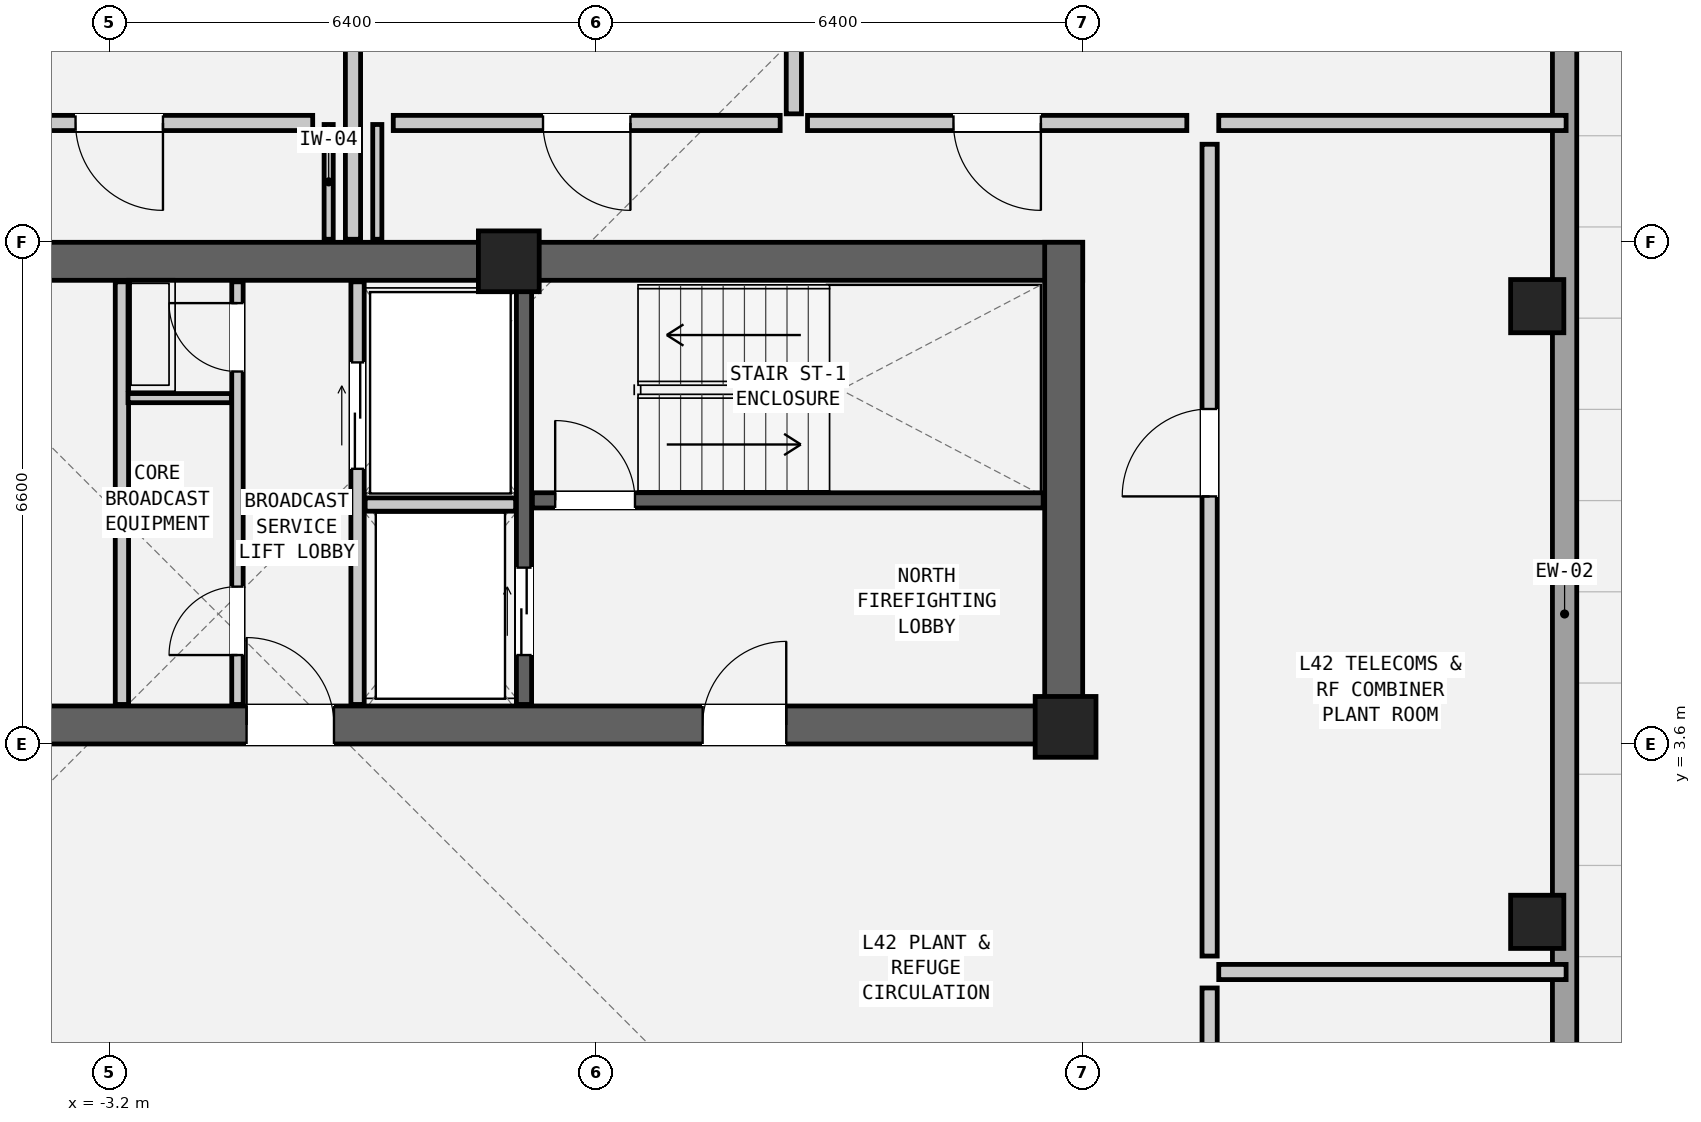
"""IFC4 building model, lengths in metres.
Left out: names, types, materials, properties, quantities, classifications, styles, units other than length and angle.
Written with IfcOpenShell. Run it as: python <this file> out.ifc"""

import sys

from ifc_helpers import new_model, si_unit, direction, frame, frame_2d, origin, origin_2d, place, context, subcontext, project, spatial, rectangle, hollow_rectangle, extrude, element, fill, save


model = new_model("IFC4")
c1 = context("Model", 3, precision=1e-05, world=origin(), true_north=direction((0.0, 1.0)))
c2 = subcontext(c1, "Body", "Model", "MODEL_VIEW")
j1 = project(units=[si_unit("LENGTHUNIT", "METRE"), si_unit("PLANEANGLEUNIT", "RADIAN")], contexts=[c1])
p1 = place(None, origin())
s1 = spatial("IfcSite", under=j1, at=p1, CompositionType="ELEMENT")
p2 = place(p1, origin())
s2 = spatial("IfcBuilding", under=s1, at=p2, CompositionType="ELEMENT")
p3 = place(p2, frame((0.0, 0.0, 144.6)))
s3 = spatial("IfcBuildingStorey", under=s2, at=p3, CompositionType="ELEMENT", Elevation=144.6)
p4 = place(p3, frame((-9.6, 9.95, 0.0), z_axis=(0.0, 0.0, 1.0), x_axis=(1.0, 0.0, 0.0)))
e1 = element("IfcWall", 1, at=p4, inside=s3, PredefinedType="SHEAR", context=c2, shape_type="SweptSolid", body=[
    extrude(rectangle(XDim=19.2, YDim=0.5, at=frame_2d((9.6, 0.0))), origin(), (0.0, 0.0, 1.0), 3.6),
])
p5 = place(p3, frame((-9.6, 3.85, 0.0), z_axis=(0.0, 0.0, 1.0), x_axis=(1.0, 0.0, 0.0)))
e2 = element("IfcWall", 2, at=p5, inside=s3, PredefinedType="SHEAR", context=c2, shape_type="SweptSolid", body=[
    extrude(rectangle(XDim=19.2, YDim=0.5, at=frame_2d((9.6, 0.0))), origin(), (0.0, 0.0, 1.0), 3.6),
])
p6 = place(p5, frame((14.2, 0.0, 0.0)))
e3 = element("IfcOpeningElement", 3, at=p6, cuts=e2, PredefinedType="OPENING", context=c2, shape_type="SweptSolid", body=[
    extrude(rectangle(XDim=1.1, YDim=2.08, at=frame_2d((0.55, 1.04))), frame((0.0, 0.262, 0.0), z_axis=(0.0, -1.0, 0.0), x_axis=(1.0, 0.0, 0.0)), (0.0, 0.0, 1.0), 0.524),
])
p7 = place(p5, frame((8.2, 0.0, 0.0)))
e4 = element("IfcOpeningElement", 4, at=p7, cuts=e2, PredefinedType="OPENING", context=c2, shape_type="SweptSolid", body=[
    extrude(rectangle(XDim=1.15, YDim=2.1, at=frame_2d((0.575, 1.05))), frame((0.0, 0.262, 0.0), z_axis=(0.0, -1.0, 0.0), x_axis=(1.0, 0.0, 0.0)), (0.0, 0.0, 1.0), 0.524),
])
p8 = place(p5, frame((2.5, 0.0, 0.0)))
e5 = element("IfcOpeningElement", 5, at=p8, cuts=e2, PredefinedType="OPENING", context=c2, shape_type="SweptSolid", body=[
    extrude(rectangle(XDim=1.2, YDim=2.1, at=frame_2d((0.6, 1.05))), frame((0.0, 0.262, 0.0), z_axis=(0.0, -1.0, 0.0), x_axis=(1.0, 0.0, 0.0)), (0.0, 0.0, 1.0), 0.524),
])
p9 = place(p3, frame((9.35, 3.6, 0.0), z_axis=(0.0, 0.0, 1.0), x_axis=(0.0, 1.0, 0.0)))
e6 = element("IfcWall", 6, at=p9, inside=s3, PredefinedType="SHEAR", context=c2, shape_type="SweptSolid", body=[
    extrude(rectangle(XDim=6.6, YDim=0.5, at=frame_2d((3.3, 0.0))), origin(), (0.0, 0.0, 1.0), 3.6),
])
for number, where, z_axis, x_axis in (
    (7, (15.58, 1.26, 0.0), (0.0, 0.0, 1.0), (0.0, 1.0, 0.0)),
    (8, (15.58, 9.36, 0.0), (0.0, 0.0, 1.0), (0.0, 1.0, 0.0)),
):
    element("IfcColumn", number, at=place(p3, frame(where, z_axis=z_axis, x_axis=x_axis)), inside=s3, PredefinedType="COLUMN", context=c2, shape_type="SweptSolid", body=[
        extrude(hollow_rectangle(XDim=0.7, YDim=0.7, WallThickness=0.045, at=origin_2d()), origin(), (0.0, 0.0, 1.0), 3.6),
    ])
for number, where, z_axis, x_axis in (
    (9, (2.05, 9.95, 0.0), (0.0, 0.0, 1.0), (1.0, 0.0, 0.0)),
    (10, (9.375, 3.825, 0.0), (0.0, 0.0, 1.0), (1.0, 0.0, 0.0)),
):
    element("IfcColumn", number, at=place(p3, frame(where, z_axis=z_axis, x_axis=x_axis)), inside=s3, PredefinedType="COLUMN", context=c2, shape_type="SweptSolid", body=[
        extrude(rectangle(XDim=0.8, YDim=0.8, at=origin_2d()), origin(), (0.0, 0.0, 1.0), 3.6),
    ])
p10 = place(p3, frame((15.94, 17.122, 0.0), z_axis=(0.0, 0.0, 1.0), x_axis=(0.0, -1.0, 0.0)))
e11 = element("IfcWall", 11, at=p10, inside=s3, PredefinedType="SOLIDWALL", context=c2, shape_type="SweptSolid", body=[
    extrude(rectangle(XDim=23.624, YDim=0.32, at=frame_2d((11.812, 0.0))), origin(), (0.0, 0.0, 1.0), 2.242),
])
p11 = place(p3, frame((2.36, 6.805, 0.0), z_axis=(0.0, 0.0, 1.0), x_axis=(1.0, 0.0, 0.0)))
e12 = element("IfcWall", 12, at=p11, inside=s3, PredefinedType="SHEAR", context=c2, shape_type="SweptSolid", body=[
    extrude(rectangle(XDim=6.72, YDim=0.2, at=frame_2d((3.36, 0.0))), origin(), (0.0, 0.0, 1.0), 3.38),
])
p12 = place(p11, frame((0.3, 0.0, 0.0)))
e13 = element("IfcOpeningElement", 13, at=p12, cuts=e12, PredefinedType="OPENING", context=c2, shape_type="SweptSolid", body=[
    extrude(rectangle(XDim=1.05, YDim=2.08, at=frame_2d((0.525, 1.04))), frame((0.0, 0.112, 0.0), z_axis=(0.0, -1.0, 0.0), x_axis=(1.0, 0.0, 0.0)), (0.0, 0.0, 1.0), 0.224),
])
p13 = place(p3, frame((2.25, 4.12, 0.0), z_axis=(0.0, 0.0, 1.0), x_axis=(0.0, 1.0, 0.0)))
e14 = element("IfcWall", 14, at=p13, inside=s3, PredefinedType="SHEAR", context=c2, shape_type="SweptSolid", body=[
    extrude(rectangle(XDim=5.56, YDim=0.2, at=frame_2d((2.78, 0.0))), origin(), (0.0, 0.0, 1.0), 3.38),
])
p14 = place(p13, frame((0.65, 0.0, 0.0)))
e15 = element("IfcOpeningElement", 15, at=p14, cuts=e14, PredefinedType="OPENING", context=c2, shape_type="SweptSolid", body=[
    extrude(rectangle(XDim=1.15, YDim=2.08, at=frame_2d((0.575, 1.04))), frame((0.0, 0.112, 0.0), z_axis=(0.0, -1.0, 0.0), x_axis=(1.0, 0.0, 0.0)), (0.0, 0.0, 1.0), 0.224),
])
p15 = place(p3, frame((0.06, 4.12, 0.0), z_axis=(0.0, 0.0, 1.0), x_axis=(0.0, 1.0, 0.0)))
e16 = element("IfcWall", 16, at=p15, inside=s3, PredefinedType="PARTITIONING", context=c2, shape_type="SweptSolid", body=[
    extrude(rectangle(XDim=5.56, YDim=0.175, at=frame_2d((2.78, 0.0))), origin(), (0.0, 0.0, 1.0), 3.38),
])
p16 = place(p15, frame((3.1, 0.0, 0.0)))
e17 = element("IfcOpeningElement", 17, at=p16, cuts=e16, PredefinedType="OPENING", context=c2, shape_type="SweptSolid", body=[
    extrude(rectangle(XDim=1.4, YDim=2.12, at=frame_2d((0.7, 1.06))), frame((0.0, 0.1, 0.0), z_axis=(0.0, -1.0, 0.0), x_axis=(1.0, 0.0, 0.0)), (0.0, 0.0, 1.0), 0.199),
])
p17 = place(p3, frame((0.16, 6.75, 0.0), z_axis=(0.0, 0.0, 1.0), x_axis=(1.0, 0.0, 0.0)))
e18 = element("IfcWall", 18, at=p17, inside=s3, PredefinedType="PARTITIONING", context=c2, shape_type="SweptSolid", body=[
    extrude(rectangle(XDim=1.98, YDim=0.175, at=frame_2d((0.99, 0.0))), origin(), (0.0, 0.0, 1.0), 3.38),
])
p18 = place(p3, frame((-3.04, 4.12, 0.0), z_axis=(0.0, 0.0, 1.0), x_axis=(0.0, 1.0, 0.0)))
e19 = element("IfcWall", 19, at=p18, inside=s3, PredefinedType="PARTITIONING", context=c2, shape_type="SweptSolid", body=[
    extrude(rectangle(XDim=5.56, YDim=0.175, at=frame_2d((2.78, 0.0))), origin(), (0.0, 0.0, 1.0), 3.38),
])
p19 = place(p3, frame((-1.52, 4.12, 0.0), z_axis=(0.0, 0.0, 1.0), x_axis=(0.0, 1.0, 0.0)))
e20 = element("IfcWall", 20, at=p19, inside=s3, PredefinedType="PARTITIONING", context=c2, shape_type="SweptSolid", body=[
    extrude(rectangle(XDim=5.56, YDim=0.15, at=frame_2d((2.78, 0.0))), origin(), (0.0, 0.0, 1.0), 3.38),
])
p20 = place(p19, frame((4.38, 0.0, 0.0)))
e21 = element("IfcOpeningElement", 21, at=p20, cuts=e20, PredefinedType="OPENING", context=c2, shape_type="SweptSolid", body=[
    extrude(rectangle(XDim=0.9, YDim=2.05, at=frame_2d((0.45, 1.025))), frame((0.0, 0.087, 0.0), z_axis=(0.0, -1.0, 0.0), x_axis=(1.0, 0.0, 0.0)), (0.0, 0.0, 1.0), 0.174),
])
p21 = place(p19, frame((0.65, 0.0, 0.0)))
e22 = element("IfcOpeningElement", 22, at=p21, cuts=e20, PredefinedType="OPENING", context=c2, shape_type="SweptSolid", body=[
    extrude(rectangle(XDim=0.9, YDim=2.05, at=frame_2d((0.45, 1.025))), frame((0.0, 0.087, 0.0), z_axis=(0.0, -1.0, 0.0), x_axis=(1.0, 0.0, 0.0)), (0.0, 0.0, 1.0), 0.174),
])
p22 = place(p3, frame((-2.96, 8.15, 0.0), z_axis=(0.0, 0.0, 1.0), x_axis=(1.0, 0.0, 0.0)))
e23 = element("IfcWall", 23, at=p22, inside=s3, PredefinedType="PARTITIONING", context=c2, shape_type="SweptSolid", body=[
    extrude(rectangle(XDim=1.36, YDim=0.12, at=frame_2d((0.68, 0.0))), origin(), (0.0, 0.0, 1.0), 3.38),
])
p23 = place(p3, frame((0.0, 10.24, 0.0), z_axis=(0.0, 0.0, 1.0), x_axis=(0.0, 1.0, 0.0)))
e24 = element("IfcWall", 24, at=p23, inside=s3, PredefinedType="PARTITIONING", context=c2, shape_type="SweptSolid", body=[
    extrude(rectangle(XDim=12.8, YDim=0.2, at=frame_2d((6.4, 0.0))), origin(), (0.0, 0.0, 1.0), 2.901),
])
for number, where, z_axis, x_axis in (
    (25, (-0.32, 10.24, 0.0), (0.0, 0.0, 1.0), (0.0, 1.0, 0.0)),
    (26, (0.32, 10.24, 0.0), (0.0, 0.0, 1.0), (0.0, 1.0, 0.0)),
):
    element("IfcWall", number, at=place(p3, frame(where, z_axis=z_axis, x_axis=x_axis)), inside=s3, PredefinedType="PARTITIONING", context=c2, shape_type="SweptSolid", body=[
        extrude(rectangle(XDim=1.51, YDim=0.12, at=frame_2d((0.755, 0.0))), origin(), (0.0, 0.0, 1.0), 2.901),
    ])
p24 = place(p3, frame((-0.53, 11.77, 0.0), z_axis=(0.0, 0.0, 1.0), x_axis=(-1.0, 0.0, 0.0)))
e27 = element("IfcWall", 27, at=p24, inside=s3, PredefinedType="PARTITIONING", context=c2, shape_type="SweptSolid", body=[
    extrude(rectangle(XDim=5.09, YDim=0.2, at=frame_2d((2.545, 0.0))), origin(), (0.0, 0.0, 1.0), 3.38),
])
p25 = place(p24, frame((1.97, 0.0, 0.0)))
e28 = element("IfcOpeningElement", 28, at=p25, cuts=e27, PredefinedType="OPENING", context=c2, shape_type="SweptSolid", body=[
    extrude(rectangle(XDim=1.15, YDim=2.1, at=frame_2d((0.575, 1.05))), frame((0.0, 0.112, 0.0), z_axis=(0.0, -1.0, 0.0), x_axis=(1.0, 0.0, 0.0)), (0.0, 0.0, 1.0), 0.224),
])
p26 = place(p3, frame((5.62, 11.77, 0.0), z_axis=(0.0, 0.0, 1.0), x_axis=(-1.0, 0.0, 0.0)))
e29 = element("IfcWall", 29, at=p26, inside=s3, PredefinedType="PARTITIONING", context=c2, shape_type="SweptSolid", body=[
    extrude(rectangle(XDim=5.09, YDim=0.2, at=frame_2d((2.545, 0.0))), origin(), (0.0, 0.0, 1.0), 3.38),
])
p27 = place(p26, frame((1.97, 0.0, 0.0)))
e30 = element("IfcOpeningElement", 30, at=p27, cuts=e29, PredefinedType="OPENING", context=c2, shape_type="SweptSolid", body=[
    extrude(rectangle(XDim=1.15, YDim=2.1, at=frame_2d((0.575, 1.05))), frame((0.0, 0.112, 0.0), z_axis=(0.0, -1.0, 0.0), x_axis=(1.0, 0.0, 0.0)), (0.0, 0.0, 1.0), 0.224),
])
p28 = place(p3, frame((5.8, 11.89, 0.0), z_axis=(0.0, 0.0, 1.0), x_axis=(0.0, 1.0, 0.0)))
e31 = element("IfcWall", 31, at=p28, inside=s3, PredefinedType="PARTITIONING", context=c2, shape_type="SweptSolid", body=[
    extrude(rectangle(XDim=11.15, YDim=0.2, at=frame_2d((5.575, 0.0))), origin(), (0.0, 0.0, 1.0), 2.901),
])
p29 = place(p3, frame((10.97, 11.77, 0.0), z_axis=(0.0, 0.0, 1.0), x_axis=(-1.0, 0.0, 0.0)))
e32 = element("IfcWall", 32, at=p29, inside=s3, PredefinedType="PARTITIONING", context=c2, shape_type="SweptSolid", body=[
    extrude(rectangle(XDim=4.99, YDim=0.2, at=frame_2d((2.495, 0.0))), origin(), (0.0, 0.0, 1.0), 3.38),
])
p30 = place(p29, frame((1.92, 0.0, 0.0)))
e33 = element("IfcOpeningElement", 33, at=p30, cuts=e32, PredefinedType="OPENING", context=c2, shape_type="SweptSolid", body=[
    extrude(rectangle(XDim=1.15, YDim=2.1, at=frame_2d((0.575, 1.05))), frame((0.0, 0.112, 0.0), z_axis=(0.0, -1.0, 0.0), x_axis=(1.0, 0.0, 0.0)), (0.0, 0.0, 1.0), 0.224),
])
p31 = place(p3, frame((11.39, 11.77, 0.0), z_axis=(0.0, 0.0, 1.0), x_axis=(1.0, 0.0, 0.0)))
e34 = element("IfcWall", 34, at=p31, inside=s3, PredefinedType="PARTITIONING", context=c2, shape_type="SweptSolid", body=[
    extrude(rectangle(XDim=4.57, YDim=0.2, at=frame_2d((2.285, 0.0))), origin(), (0.0, 0.0, 1.0), 3.38),
])
p32 = place(p3, frame((11.39, 0.6, 0.0), z_axis=(0.0, 0.0, 1.0), x_axis=(1.0, 0.0, 0.0)))
e35 = element("IfcWall", 35, at=p32, inside=s3, PredefinedType="PARTITIONING", context=c2, shape_type="SweptSolid", body=[
    extrude(rectangle(XDim=4.57, YDim=0.2, at=frame_2d((2.285, 0.0))), origin(), (0.0, 0.0, 1.0), 2.901),
])
p33 = place(p3, frame((11.27, -10.29, 0.0), z_axis=(0.0, 0.0, 1.0), x_axis=(0.0, 1.0, 0.0)))
e36 = element("IfcWall", 36, at=p33, inside=s3, PredefinedType="PARTITIONING", context=c2, shape_type="SweptSolid", body=[
    extrude(rectangle(XDim=10.68, YDim=0.2, at=frame_2d((5.34, 0.0))), origin(), (0.0, 0.0, 1.0), 3.38),
])
p34 = place(p33, frame((4.765, 0.0, 0.0)))
e37 = element("IfcOpeningElement", 37, at=p34, cuts=e36, PredefinedType="OPENING", context=c2, shape_type="SweptSolid", body=[
    extrude(rectangle(XDim=1.15, YDim=2.1, at=frame_2d((0.575, 1.05))), frame((0.0, 0.112, 0.0), z_axis=(0.0, -1.0, 0.0), x_axis=(1.0, 0.0, 0.0)), (0.0, 0.0, 1.0), 0.224),
])
p35 = place(p3, frame((11.27, 0.81, 0.0), z_axis=(0.0, 0.0, 1.0), x_axis=(0.0, 1.0, 0.0)))
e38 = element("IfcWall", 38, at=p35, inside=s3, PredefinedType="PARTITIONING", context=c2, shape_type="SweptSolid", body=[
    extrude(rectangle(XDim=10.68, YDim=0.2, at=frame_2d((5.34, 0.0))), origin(), (0.0, 0.0, 1.0), 3.38),
])
p36 = place(p35, frame((6.047, 0.0, 0.0)))
e39 = element("IfcOpeningElement", 39, at=p36, cuts=e38, PredefinedType="OPENING", context=c2, shape_type="SweptSolid", body=[
    extrude(rectangle(XDim=1.15, YDim=2.1, at=frame_2d((0.575, 1.05))), frame((0.0, 0.112, 0.0), z_axis=(0.0, -1.0, 0.0), x_axis=(1.0, 0.0, 0.0)), (0.0, 0.0, 1.0), 0.224),
])
p37 = place(p12, origin())
e40 = element("IfcDoor", 40, at=p37, inside=s3, OperationType="SINGLE_SWING_LEFT", PredefinedType="DOOR", context=c2, shape_type="SweptSolid", body=[
    extrude(rectangle(XDim=1.05, YDim=2.08, at=frame_2d((0.525, 1.04))), frame((0.0, 0.025, 0.0), z_axis=(0.0, -1.0, 0.0), x_axis=(1.0, 0.0, 0.0)), (0.0, 0.0, 1.0), 0.05),
])
fill(e13, e40)
p38 = place(p6, origin())
e41 = element("IfcDoor", 41, at=p38, inside=s3, OperationType="SINGLE_SWING_RIGHT", PredefinedType="DOOR", context=c2, shape_type="SweptSolid", body=[
    extrude(rectangle(XDim=1.1, YDim=2.08, at=frame_2d((0.55, 1.04))), frame((0.0, 0.025, 0.0), z_axis=(0.0, -1.0, 0.0), x_axis=(1.0, 0.0, 0.0)), (0.0, 0.0, 1.0), 0.05),
])
fill(e3, e41)
p39 = place(p14, origin())
e42 = element("IfcDoor", 42, at=p39, inside=s3, OperationType="DOUBLE_DOOR_SLIDING", PredefinedType="DOOR", context=c2, shape_type="SweptSolid", body=[
    extrude(rectangle(XDim=1.15, YDim=2.08, at=frame_2d((0.575, 1.04))), frame((0.0, 0.025, 0.0), z_axis=(0.0, -1.0, 0.0), x_axis=(1.0, 0.0, 0.0)), (0.0, 0.0, 1.0), 0.05),
])
fill(e15, e42)
p40 = place(p16, origin())
e43 = element("IfcDoor", 43, at=p40, inside=s3, OperationType="DOUBLE_DOOR_SLIDING", PredefinedType="DOOR", context=c2, shape_type="SweptSolid", body=[
    extrude(rectangle(XDim=1.4, YDim=2.12, at=frame_2d((0.7, 1.06))), frame((0.0, 0.025, 0.0), z_axis=(0.0, -1.0, 0.0), x_axis=(1.0, 0.0, 0.0)), (0.0, 0.0, 1.0), 0.05),
])
fill(e17, e43)
p41 = place(p7, origin())
e44 = element("IfcDoor", 44, at=p41, inside=s3, OperationType="SINGLE_SWING_LEFT", PredefinedType="DOOR", context=c2, shape_type="SweptSolid", body=[
    extrude(rectangle(XDim=1.15, YDim=2.1, at=frame_2d((0.575, 1.05))), frame((0.0, 0.025, 0.0), z_axis=(0.0, -1.0, 0.0), x_axis=(1.0, 0.0, 0.0)), (0.0, 0.0, 1.0), 0.05),
])
fill(e4, e44)
p42 = place(p20, origin())
e45 = element("IfcDoor", 45, at=p42, inside=s3, OperationType="SINGLE_SWING_RIGHT", PredefinedType="DOOR", context=c2, shape_type="SweptSolid", body=[
    extrude(rectangle(XDim=0.9, YDim=2.05, at=frame_2d((0.45, 1.025))), frame((0.0, 0.025, 0.0), z_axis=(0.0, -1.0, 0.0), x_axis=(1.0, 0.0, 0.0)), (0.0, 0.0, 1.0), 0.05),
])
fill(e21, e45)
p43 = place(p21, origin())
e46 = element("IfcDoor", 46, at=p43, inside=s3, OperationType="SINGLE_SWING_LEFT", PredefinedType="DOOR", context=c2, shape_type="SweptSolid", body=[
    extrude(rectangle(XDim=0.9, YDim=2.05, at=frame_2d((0.45, 1.025))), frame((0.0, 0.025, 0.0), z_axis=(0.0, -1.0, 0.0), x_axis=(1.0, 0.0, 0.0)), (0.0, 0.0, 1.0), 0.05),
])
fill(e22, e46)
p44 = place(p25, origin())
e47 = element("IfcDoor", 47, at=p44, inside=s3, OperationType="SINGLE_SWING_LEFT", PredefinedType="DOOR", context=c2, shape_type="SweptSolid", body=[
    extrude(rectangle(XDim=1.15, YDim=2.1, at=frame_2d((0.575, 1.05))), frame((0.0, 0.025, 0.0), z_axis=(0.0, -1.0, 0.0), x_axis=(1.0, 0.0, 0.0)), (0.0, 0.0, 1.0), 0.05),
])
fill(e28, e47)
p45 = place(p27, origin())
e48 = element("IfcDoor", 48, at=p45, inside=s3, OperationType="SINGLE_SWING_LEFT", PredefinedType="DOOR", context=c2, shape_type="SweptSolid", body=[
    extrude(rectangle(XDim=1.15, YDim=2.1, at=frame_2d((0.575, 1.05))), frame((0.0, 0.025, 0.0), z_axis=(0.0, -1.0, 0.0), x_axis=(1.0, 0.0, 0.0)), (0.0, 0.0, 1.0), 0.05),
])
fill(e30, e48)
p46 = place(p30, origin())
e49 = element("IfcDoor", 49, at=p46, inside=s3, OperationType="SINGLE_SWING_LEFT", PredefinedType="DOOR", context=c2, shape_type="SweptSolid", body=[
    extrude(rectangle(XDim=1.15, YDim=2.1, at=frame_2d((0.575, 1.05))), frame((0.0, 0.025, 0.0), z_axis=(0.0, -1.0, 0.0), x_axis=(1.0, 0.0, 0.0)), (0.0, 0.0, 1.0), 0.05),
])
fill(e33, e49)
p47 = place(p36, origin())
e50 = element("IfcDoor", 50, at=p47, inside=s3, OperationType="SINGLE_SWING_LEFT", PredefinedType="DOOR", context=c2, shape_type="SweptSolid", body=[
    extrude(rectangle(XDim=1.15, YDim=2.1, at=frame_2d((0.575, 1.05))), frame((0.0, 0.025, 0.0), z_axis=(0.0, -1.0, 0.0), x_axis=(1.0, 0.0, 0.0)), (0.0, 0.0, 1.0), 0.05),
])
fill(e39, e50)
save(model, sys.argv[1])
